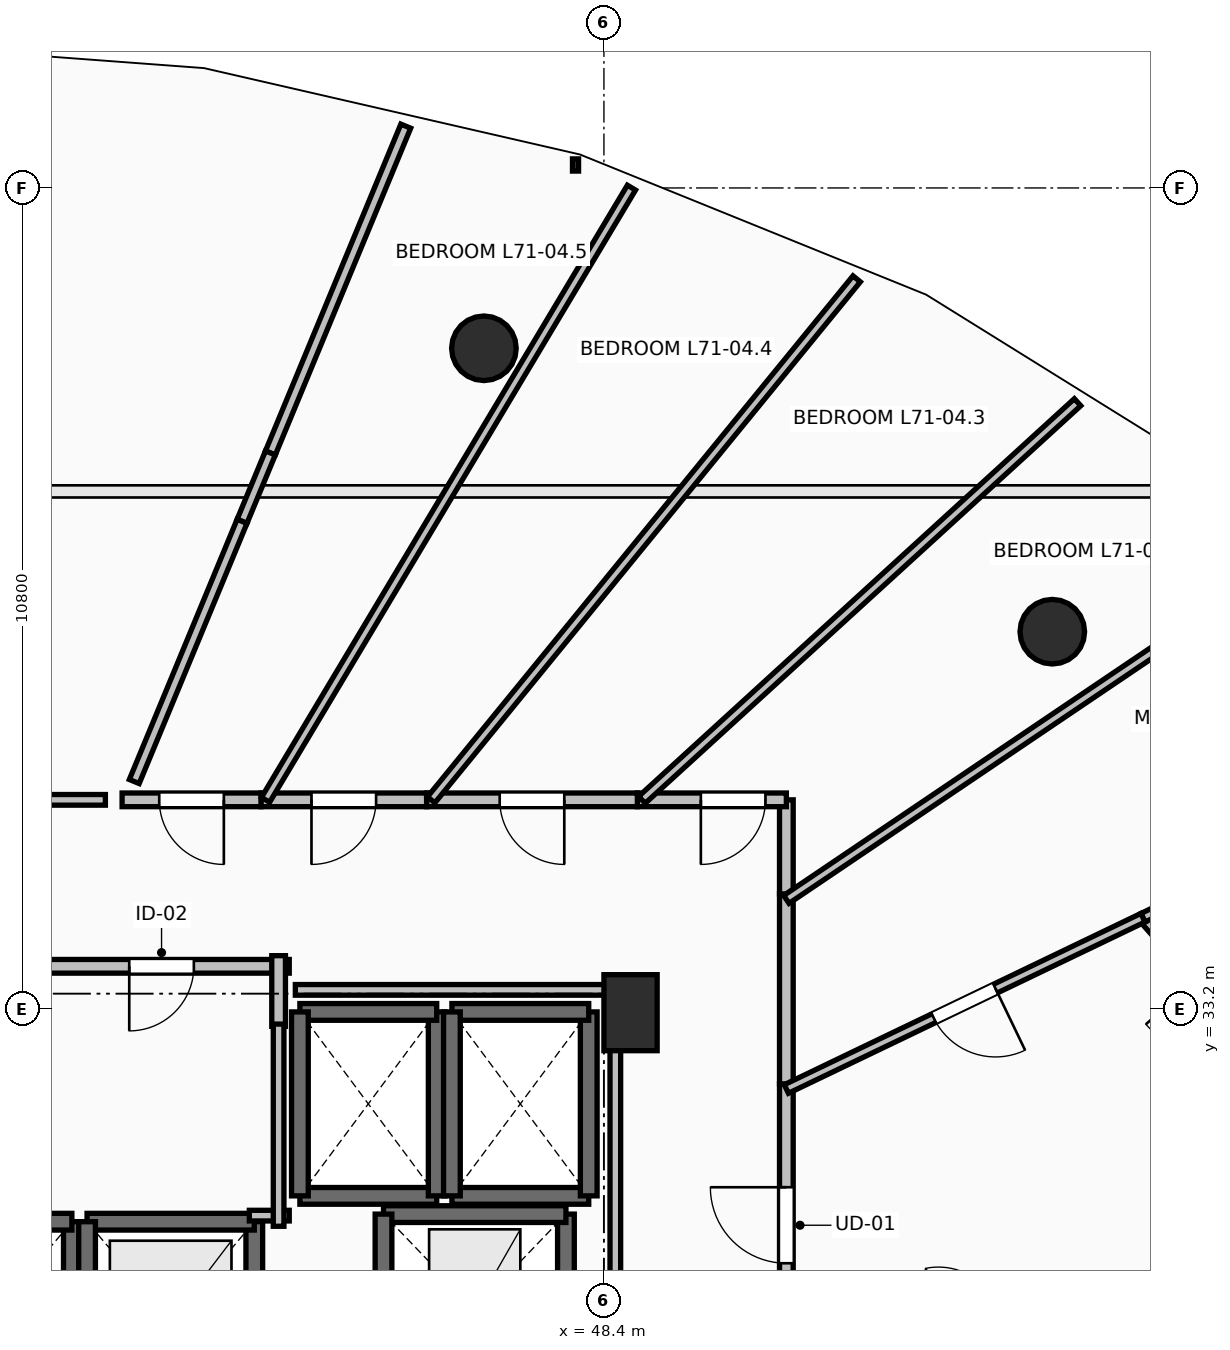
"""IFC4 building model, lengths in metres.
Left out: names, types, materials, properties, quantities, classifications, styles, units other than length and angle.
Written with IfcOpenShell. Run it as: python <this file> out.ifc"""

import sys

from ifc_helpers import new_model, si_unit, direction, frame, frame_2d, origin, origin_2d, place, context, subcontext, project, spatial, rectangle, circle, extrude, element, fill, save


model = new_model("IFC4")
c1 = context("Model", 3, precision=1e-05, world=origin(), true_north=direction((0.0, 1.0)))
c2 = subcontext(c1, "Body", "Model", "MODEL_VIEW")
j1 = project(units=[si_unit("LENGTHUNIT", "METRE"), si_unit("PLANEANGLEUNIT", "RADIAN")], contexts=[c1])
p1 = place(None, origin())
s1 = spatial("IfcSite", under=j1, at=p1, CompositionType="ELEMENT")
p2 = place(p1, origin())
s2 = spatial("IfcBuilding", under=s1, at=p2, CompositionType="ELEMENT")
p3 = place(p2, frame((0.0, 0.0, 262.65)))
s3 = spatial("IfcBuildingStorey", under=s2, at=p3, CompositionType="ELEMENT", Elevation=262.65)
for number, where, z_axis, x_axis in (
    (1, (54.299, 38.162, 0.0), (0.0, 0.0, 1.0), (0.707, 0.707, 0.0)),
    (2, (46.821, 41.891, 0.0), (0.0, 0.0, 1.0), (0.383, 0.924, 0.0)),
):
    element("IfcColumn", number, at=place(p3, frame(where, z_axis=z_axis, x_axis=x_axis)), inside=s3, PredefinedType="COLUMN", context=c2, shape_type="SweptSolid", body=[
        extrude(circle(Radius=0.425, at=origin_2d()), origin(), (0.0, 0.0, 1.0), 3.55),
    ])
p4 = place(p3, frame((48.75, 33.15, 0.0), z_axis=(0.0, 0.0, 1.0), x_axis=(1.0, 0.0, 0.0)))
e3 = element("IfcColumn", 3, at=p4, inside=s3, PredefinedType="PILASTER", context=c2, shape_type="SweptSolid", body=[
    extrude(rectangle(XDim=0.7, YDim=1.0, at=origin_2d()), origin(), (0.0, 0.0, 1.0), 3.55),
])
p5 = place(p3, frame((41.4, 27.8, 0.0), z_axis=(0.0, 0.0, 1.0), x_axis=(0.0, 1.0, 0.0)))
e4 = element("IfcWall", 4, at=p5, inside=s3, PredefinedType="SOLIDWALL", context=c2, shape_type="SweptSolid", body=[
    extrude(rectangle(XDim=2.6, YDim=0.22, at=frame_2d((1.3, 0.0))), origin(), (0.0, 0.0, 1.0), 3.29),
])
p6 = place(p3, frame((41.4, 30.4, 0.0), z_axis=(0.0, 0.0, 1.0), x_axis=(-1.0, 0.0, 0.0)))
e5 = element("IfcWall", 5, at=p6, inside=s3, PredefinedType="SOLIDWALL", context=c2, shape_type="SweptSolid", body=[
    extrude(rectangle(XDim=2.2, YDim=0.22, at=frame_2d((1.1, 0.0))), origin(), (0.0, 0.0, 1.0), 3.29),
])
p7 = place(p3, frame((43.8, 27.8, 0.0), z_axis=(0.0, 0.0, 1.0), x_axis=(0.0, 1.0, 0.0)))
e6 = element("IfcWall", 6, at=p7, inside=s3, PredefinedType="SOLIDWALL", context=c2, shape_type="SweptSolid", body=[
    extrude(rectangle(XDim=2.6, YDim=0.22, at=frame_2d((1.3, 0.0))), origin(), (0.0, 0.0, 1.0), 3.29),
])
p8 = place(p3, frame((43.8, 30.4, 0.0), z_axis=(0.0, 0.0, 1.0), x_axis=(-1.0, 0.0, 0.0)))
e7 = element("IfcWall", 7, at=p8, inside=s3, PredefinedType="SOLIDWALL", context=c2, shape_type="SweptSolid", body=[
    extrude(rectangle(XDim=2.2, YDim=0.22, at=frame_2d((1.1, 0.0))), origin(), (0.0, 0.0, 1.0), 3.29),
])
p9 = place(p3, frame((41.6, 30.4, 0.0), z_axis=(0.0, 0.0, 1.0), x_axis=(0.0, -1.0, 0.0)))
e8 = element("IfcWall", 8, at=p9, inside=s3, PredefinedType="SOLIDWALL", context=c2, shape_type="SweptSolid", body=[
    extrude(rectangle(XDim=2.6, YDim=0.22, at=frame_2d((1.3, 0.0))), origin(), (0.0, 0.0, 1.0), 3.29),
])
p10 = place(p3, frame((44.4, 30.74, 0.0), z_axis=(0.0, 0.0, 1.0), x_axis=(1.0, 0.0, 0.0)))
e9 = element("IfcWall", 9, at=p10, inside=s3, PredefinedType="SOLIDWALL", context=c2, shape_type="SweptSolid", body=[
    extrude(rectangle(XDim=1.8, YDim=0.22, at=frame_2d((0.9, 0.0))), origin(), (0.0, 0.0, 1.0), 3.29),
])
p11 = place(p3, frame((46.2, 30.74, 0.0), z_axis=(0.0, 0.0, 1.0), x_axis=(0.0, 1.0, 0.0)))
e10 = element("IfcWall", 10, at=p11, inside=s3, PredefinedType="SOLIDWALL", context=c2, shape_type="SweptSolid", body=[
    extrude(rectangle(XDim=2.42, YDim=0.22, at=frame_2d((1.21, 0.0))), origin(), (0.0, 0.0, 1.0), 3.29),
])
p12 = place(p3, frame((46.2, 33.16, 0.0), z_axis=(0.0, 0.0, 1.0), x_axis=(-1.0, 0.0, 0.0)))
e11 = element("IfcWall", 11, at=p12, inside=s3, PredefinedType="SOLIDWALL", context=c2, shape_type="SweptSolid", body=[
    extrude(rectangle(XDim=1.8, YDim=0.22, at=frame_2d((0.9, 0.0))), origin(), (0.0, 0.0, 1.0), 3.29),
])
p13 = place(p3, frame((44.4, 33.16, 0.0), z_axis=(0.0, 0.0, 1.0), x_axis=(0.0, -1.0, 0.0)))
e12 = element("IfcWall", 12, at=p13, inside=s3, PredefinedType="SOLIDWALL", context=c2, shape_type="SweptSolid", body=[
    extrude(rectangle(XDim=2.42, YDim=0.22, at=frame_2d((1.21, 0.0))), origin(), (0.0, 0.0, 1.0), 3.29),
])
p14 = place(p3, frame((46.4, 30.74, 0.0), z_axis=(0.0, 0.0, 1.0), x_axis=(1.0, 0.0, 0.0)))
e13 = element("IfcWall", 13, at=p14, inside=s3, PredefinedType="SOLIDWALL", context=c2, shape_type="SweptSolid", body=[
    extrude(rectangle(XDim=1.8, YDim=0.22, at=frame_2d((0.9, 0.0))), origin(), (0.0, 0.0, 1.0), 3.29),
])
p15 = place(p3, frame((48.2, 30.74, 0.0), z_axis=(0.0, 0.0, 1.0), x_axis=(0.0, 1.0, 0.0)))
e14 = element("IfcWall", 14, at=p15, inside=s3, PredefinedType="SOLIDWALL", context=c2, shape_type="SweptSolid", body=[
    extrude(rectangle(XDim=2.42, YDim=0.22, at=frame_2d((1.21, 0.0))), origin(), (0.0, 0.0, 1.0), 3.29),
])
p16 = place(p3, frame((48.2, 33.16, 0.0), z_axis=(0.0, 0.0, 1.0), x_axis=(-1.0, 0.0, 0.0)))
e15 = element("IfcWall", 15, at=p16, inside=s3, PredefinedType="SOLIDWALL", context=c2, shape_type="SweptSolid", body=[
    extrude(rectangle(XDim=1.8, YDim=0.22, at=frame_2d((0.9, 0.0))), origin(), (0.0, 0.0, 1.0), 3.29),
])
p17 = place(p3, frame((46.4, 33.16, 0.0), z_axis=(0.0, 0.0, 1.0), x_axis=(0.0, -1.0, 0.0)))
e16 = element("IfcWall", 16, at=p17, inside=s3, PredefinedType="SOLIDWALL", context=c2, shape_type="SweptSolid", body=[
    extrude(rectangle(XDim=2.42, YDim=0.22, at=frame_2d((1.21, 0.0))), origin(), (0.0, 0.0, 1.0), 3.29),
])
p18 = place(p3, frame((47.9, 28.0, 0.0), z_axis=(0.0, 0.0, 1.0), x_axis=(0.0, 1.0, 0.0)))
e17 = element("IfcWall", 17, at=p18, inside=s3, PredefinedType="SHEAR", context=c2, shape_type="SweptSolid", body=[
    extrude(rectangle(XDim=2.5, YDim=0.22, at=frame_2d((1.25, 0.0))), origin(), (0.0, 0.0, 1.0), 3.29),
])
p19 = place(p3, frame((47.9, 30.5, 0.0), z_axis=(0.0, 0.0, 1.0), x_axis=(-1.0, 0.0, 0.0)))
e18 = element("IfcWall", 18, at=p19, inside=s3, PredefinedType="SHEAR", context=c2, shape_type="SweptSolid", body=[
    extrude(rectangle(XDim=2.4, YDim=0.22, at=frame_2d((1.2, 0.0))), origin(), (0.0, 0.0, 1.0), 3.29),
])
p20 = place(p3, frame((45.5, 30.5, 0.0), z_axis=(0.0, 0.0, 1.0), x_axis=(0.0, -1.0, 0.0)))
e19 = element("IfcWall", 19, at=p20, inside=s3, PredefinedType="SHEAR", context=c2, shape_type="SweptSolid", body=[
    extrude(rectangle(XDim=2.5, YDim=0.22, at=frame_2d((1.25, 0.0))), origin(), (0.0, 0.0, 1.0), 3.29),
])
p21 = place(p3, frame((44.26, 33.76, 0.0), z_axis=(0.0, 0.0, 1.0), x_axis=(-1.0, 0.0, 0.0)))
e20 = element("IfcWall", 20, at=p21, inside=s3, PredefinedType="PARTITIONING", context=c2, shape_type="SweptSolid", body=[
    extrude(rectangle(XDim=3.36, YDim=0.18, at=frame_2d((1.68, 0.0))), origin(), (0.0, 0.0, 1.0), 3.29),
])
p22 = place(p21, frame((1.255, 0.0, 0.0)))
e21 = element("IfcOpeningElement", 21, at=p22, cuts=e20, PredefinedType="OPENING", context=c2, shape_type="SweptSolid", body=[
    extrude(rectangle(XDim=0.85, YDim=2.1, at=frame_2d((0.425, 1.05))), frame((0.0, 0.105, 0.0), z_axis=(0.0, -1.0, 0.0), x_axis=(1.0, 0.0, 0.0)), (0.0, 0.0, 1.0), 0.21),
])
p23 = place(p3, frame((44.12, 32.97, 0.0), z_axis=(0.0, 0.0, 1.0), x_axis=(0.0, 1.0, 0.0)))
e22 = element("IfcWall", 22, at=p23, inside=s3, PredefinedType="PARTITIONING", context=c2, shape_type="SweptSolid", body=[
    extrude(rectangle(XDim=0.93, YDim=0.18, at=frame_2d((0.465, 0.0))), origin(), (0.0, 0.0, 1.0), 3.29),
])
p24 = place(p3, frame((50.8, 28.494, 0.0), z_axis=(0.0, 0.0, 1.0), x_axis=(0.0, 1.0, 0.0)))
e23 = element("IfcWall", 23, at=p24, inside=s3, PredefinedType="PARTITIONING", context=c2, shape_type="SweptSolid", body=[
    extrude(rectangle(XDim=3.719, YDim=0.18, at=frame_2d((1.859, 0.0))), origin(), (0.0, 0.0, 1.0), 3.29),
])
p25 = place(p24, frame((1.36, 0.0, 0.0)))
e24 = element("IfcOpeningElement", 24, at=p25, cuts=e23, PredefinedType="OPENING", context=c2, shape_type="SweptSolid", body=[
    extrude(rectangle(XDim=1.0, YDim=2.15, at=frame_2d((0.5, 1.075))), frame((0.0, 0.105, 0.0), z_axis=(0.0, -1.0, 0.0), x_axis=(1.0, 0.0, 0.0)), (0.0, 0.0, 1.0), 0.21),
])
p26 = place(p3, frame((50.8, 32.213, 0.0), z_axis=(0.0, 0.0, 1.0), x_axis=(0.0, 1.0, 0.0)))
e25 = element("IfcWall", 25, at=p26, inside=s3, PredefinedType="PARTITIONING", context=c2, shape_type="SweptSolid", body=[
    extrude(rectangle(XDim=2.499, YDim=0.18, at=frame_2d((1.25, 0.0))), origin(), (0.0, 0.0, 1.0), 2.482),
])
p27 = place(p3, frame((50.8, 34.712, 0.0), z_axis=(0.0, 0.0, 1.0), x_axis=(0.0, 1.0, 0.0)))
e26 = element("IfcWall", 26, at=p27, inside=s3, PredefinedType="PARTITIONING", context=c2, shape_type="SweptSolid", body=[
    extrude(rectangle(XDim=1.238, YDim=0.18, at=frame_2d((0.619, 0.0))), origin(), (0.0, 0.0, 1.0), 2.482),
])
p28 = place(p3, frame((50.8, 35.95, 0.0), z_axis=(0.0, 0.0, 1.0), x_axis=(-1.0, 0.0, 0.0)))
e27 = element("IfcWall", 27, at=p28, inside=s3, PredefinedType="PARTITIONING", context=c2, shape_type="SweptSolid", body=[
    extrude(rectangle(XDim=1.96, YDim=0.18, at=frame_2d((0.98, 0.0))), origin(), (0.0, 0.0, 1.0), 2.936),
])
p29 = place(p28, frame((0.275, 0.0, 0.0)))
e28 = element("IfcOpeningElement", 28, at=p29, cuts=e27, PredefinedType="OPENING", context=c2, shape_type="SweptSolid", body=[
    extrude(rectangle(XDim=0.85, YDim=2.1, at=frame_2d((0.425, 1.05))), frame((0.0, 0.105, 0.0), z_axis=(0.0, -1.0, 0.0), x_axis=(1.0, 0.0, 0.0)), (0.0, 0.0, 1.0), 0.21),
])
p30 = place(p3, frame((48.84, 35.95, 0.0), z_axis=(0.0, 0.0, 1.0), x_axis=(-1.0, 0.0, 0.0)))
e29 = element("IfcWall", 29, at=p30, inside=s3, PredefinedType="PARTITIONING", context=c2, shape_type="SweptSolid", body=[
    extrude(rectangle(XDim=2.773, YDim=0.18, at=frame_2d((1.387, 0.0))), origin(), (0.0, 0.0, 1.0), 2.482),
])
p31 = place(p30, frame((0.961, 0.0, 0.0)))
e30 = element("IfcOpeningElement", 30, at=p31, cuts=e29, PredefinedType="OPENING", context=c2, shape_type="SweptSolid", body=[
    extrude(rectangle(XDim=0.85, YDim=2.1, at=frame_2d((0.425, 1.05))), frame((0.0, 0.105, 0.0), z_axis=(0.0, -1.0, 0.0), x_axis=(1.0, 0.0, 0.0)), (0.0, 0.0, 1.0), 0.21),
])
p32 = place(p3, frame((46.067, 35.95, 0.0), z_axis=(0.0, 0.0, 1.0), x_axis=(-1.0, 0.0, 0.0)))
e31 = element("IfcWall", 31, at=p32, inside=s3, PredefinedType="PARTITIONING", context=c2, shape_type="SweptSolid", body=[
    extrude(rectangle(XDim=2.179, YDim=0.18, at=frame_2d((1.089, 0.0))), origin(), (0.0, 0.0, 1.0), 3.29),
])
p33 = place(p32, frame((0.665, 0.0, 0.0)))
e32 = element("IfcOpeningElement", 32, at=p33, cuts=e31, PredefinedType="OPENING", context=c2, shape_type="SweptSolid", body=[
    extrude(rectangle(XDim=0.85, YDim=2.1, at=frame_2d((0.425, 1.05))), frame((0.0, 0.105, 0.0), z_axis=(0.0, -1.0, 0.0), x_axis=(1.0, 0.0, 0.0)), (0.0, 0.0, 1.0), 0.21),
])
p34 = place(p3, frame((43.888, 35.95, 0.0), z_axis=(0.0, 0.0, 1.0), x_axis=(-1.0, 0.0, 0.0)))
e33 = element("IfcWall", 33, at=p34, inside=s3, PredefinedType="PARTITIONING", context=c2, shape_type="SweptSolid", body=[
    extrude(rectangle(XDim=1.827, YDim=0.18, at=frame_2d((0.914, 0.0))), origin(), (0.0, 0.0, 1.0), 3.29),
])
p35 = place(p34, frame((0.489, 0.0, 0.0)))
e34 = element("IfcOpeningElement", 34, at=p35, cuts=e33, PredefinedType="OPENING", context=c2, shape_type="SweptSolid", body=[
    extrude(rectangle(XDim=0.85, YDim=2.1, at=frame_2d((0.425, 1.05))), frame((0.0, 0.105, 0.0), z_axis=(0.0, -1.0, 0.0), x_axis=(1.0, 0.0, 0.0)), (0.0, 0.0, 1.0), 0.21),
])
p36 = place(p3, frame((57.512, 32.112, 0.0), z_axis=(0.0, 0.0, 1.0), x_axis=(-0.662026430628, 0.749480490173, 0.0)))
e35 = element("IfcWall", 35, at=p36, inside=s3, PredefinedType="PARTITIONING", context=c2, shape_type="SweptSolid", body=[
    extrude(rectangle(XDim=3.051, YDim=0.125, at=frame_2d((1.526, 0.0))), origin(), (0.0, 0.0, 1.0), 2.482),
])
p37 = place(p36, frame((1.076, 0.0, 0.0)))
e36 = element("IfcOpeningElement", 36, at=p37, cuts=e35, PredefinedType="OPENING", context=c2, shape_type="SweptSolid", body=[
    extrude(rectangle(XDim=0.9, YDim=2.1, at=frame_2d((0.45, 1.05))), frame((0.0, 0.077, 0.0), z_axis=(0.0, -1.0, 0.0), x_axis=(1.0, 0.0, 0.0)), (0.0, 0.0, 1.0), 0.155),
])
p38 = place(p3, frame((55.492, 34.399, 0.0), z_axis=(0.0, 0.0, 1.0), x_axis=(0.901372521065, 0.433044545363, 0.0)))
e37 = element("IfcWall", 37, at=p38, inside=s3, PredefinedType="PARTITIONING", context=c2, shape_type="SweptSolid", body=[
    extrude(rectangle(XDim=2.152, YDim=0.125, at=frame_2d((1.076, 0.0))), origin(), (0.0, 0.0, 1.0), 2.874),
])
p39 = place(p3, frame((55.492, 34.399, 0.0), z_axis=(0.0, 0.0, 1.0), x_axis=(-0.901416162018, -0.432953695968, 0.0)))
e38 = element("IfcWall", 38, at=p39, inside=s3, PredefinedType="PARTITIONING", context=c2, shape_type="SweptSolid", body=[
    extrude(rectangle(XDim=5.205, YDim=0.125, at=frame_2d((2.603, 0.0))), origin(), (0.0, 0.0, 1.0), 2.482),
])
p40 = place(p39, frame((2.152, 0.0, 0.0)))
e39 = element("IfcOpeningElement", 39, at=p40, cuts=e38, PredefinedType="OPENING", context=c2, shape_type="SweptSolid", body=[
    extrude(rectangle(XDim=0.9, YDim=2.1, at=frame_2d((0.45, 1.05))), frame((0.0, 0.077, 0.0), z_axis=(0.0, -1.0, 0.0), x_axis=(1.0, 0.0, 0.0)), (0.0, 0.0, 1.0), 0.155),
])
p41 = place(p3, frame((57.466, 39.14, 0.0), z_axis=(0.0, 0.0, 1.0), x_axis=(-0.828823335801, -0.559510391352, 0.0)))
e40 = element("IfcWall", 40, at=p41, inside=s3, PredefinedType="PARTITIONING", context=c2, shape_type="SweptSolid", body=[
    extrude(rectangle(XDim=8.043, YDim=0.125, at=frame_2d((4.021, 0.0))), origin(), (0.0, 0.0, 1.0), 2.482),
])
p42 = place(p3, frame((54.631, 41.181, 0.0), z_axis=(0.0, 0.0, 1.0), x_axis=(-0.73860604902, -0.674137303783, 0.0)))
e41 = element("IfcWall", 41, at=p42, inside=s3, PredefinedType="PARTITIONING", context=c2, shape_type="SweptSolid", body=[
    extrude(rectangle(XDim=7.76, YDim=0.125, at=frame_2d((3.88, 0.0))), origin(), (0.0, 0.0, 1.0), 2.874),
])
p43 = place(p3, frame((51.725, 42.804, 0.0), z_axis=(0.0, 0.0, 1.0), x_axis=(-0.632582563989, -0.774492930721, 0.0)))
e42 = element("IfcWall", 42, at=p43, inside=s3, PredefinedType="PARTITIONING", context=c2, shape_type="SweptSolid", body=[
    extrude(rectangle(XDim=8.85, YDim=0.125, at=frame_2d((4.425, 0.0))), origin(), (0.0, 0.0, 1.0), 2.482),
])
p44 = place(p3, frame((48.762, 44.004, 0.0), z_axis=(0.0, 0.0, 1.0), x_axis=(-0.51305247577, -0.858357243289, 0.0)))
e43 = element("IfcWall", 43, at=p44, inside=s3, PredefinedType="PARTITIONING", context=c2, shape_type="SweptSolid", body=[
    extrude(rectangle(XDim=9.383, YDim=0.125, at=frame_2d((4.691, 0.0))), origin(), (0.0, 0.0, 1.0), 2.482),
])
p45 = place(p3, frame((43.735, 30.48, 0.0), z_axis=(0.0, 0.0, 1.0), x_axis=(1.0, 0.0, 0.0)))
e44 = element("IfcWall", 44, at=p45, inside=s3, PredefinedType="PARTITIONING", context=c2, shape_type="SweptSolid", body=[
    extrude(rectangle(XDim=0.525, YDim=0.14, at=frame_2d((0.262, 0.0))), origin(), (0.0, 0.0, 1.0), 3.29),
])
p46 = place(p3, frame((44.12, 30.34, 0.0), z_axis=(0.0, 0.0, 1.0), x_axis=(0.0, 1.0, 0.0)))
e45 = element("IfcWall", 45, at=p46, inside=s3, PredefinedType="PARTITIONING", context=c2, shape_type="SweptSolid", body=[
    extrude(rectangle(XDim=2.66, YDim=0.14, at=frame_2d((1.33, 0.0))), origin(), (0.0, 0.0, 1.0), 3.29),
])
p47 = place(p3, frame((41.841, 35.95, 0.0), z_axis=(0.0, 0.0, 1.0), x_axis=(-1.0, 0.0, 0.0)))
e46 = element("IfcWall", 46, at=p47, inside=s3, PredefinedType="PARTITIONING", context=c2, shape_type="SweptSolid", body=[
    extrude(rectangle(XDim=2.391, YDim=0.14, at=frame_2d((1.196, 0.0))), origin(), (0.0, 0.0, 1.0), 3.29),
])
p48 = place(p3, frame((48.55, 28.196, 0.0), z_axis=(0.0, 0.0, 1.0), x_axis=(0.0, 1.0, 0.0)))
e47 = element("IfcWall", 47, at=p48, inside=s3, PredefinedType="PARTITIONING", context=c2, shape_type="SweptSolid", body=[
    extrude(rectangle(XDim=5.254, YDim=0.14, at=frame_2d((2.627, 0.0))), origin(), (0.0, 0.0, 1.0), 2.482),
])
p49 = place(p3, frame((48.55, 33.45, 0.0), z_axis=(0.0, 0.0, 1.0), x_axis=(-1.0, 0.0, 0.0)))
e48 = element("IfcWall", 48, at=p49, inside=s3, PredefinedType="PARTITIONING", context=c2, shape_type="SweptSolid", body=[
    extrude(rectangle(XDim=4.21, YDim=0.14, at=frame_2d((2.105, 0.0))), origin(), (0.0, 0.0, 1.0), 2.482),
])
p50 = place(p3, frame((45.793, 44.813, 0.0), z_axis=(0.0, 0.0, 1.0), x_axis=(-0.382733290986, -0.923858878818, 0.0)))
e49 = element("IfcWall", 49, at=p50, inside=s3, PredefinedType="PARTITIONING", context=c2, shape_type="SweptSolid", body=[
    extrude(rectangle(XDim=4.653, YDim=0.14, at=frame_2d((2.327, 0.0))), origin(), (0.0, 0.0, 1.0), 2.874),
])
p51 = place(p3, frame((44.012, 40.514, 0.0), z_axis=(0.0, 0.0, 1.0), x_axis=(-0.382941999237, -0.923772388211, 0.0)))
e50 = element("IfcWall", 50, at=p51, inside=s3, PredefinedType="PARTITIONING", context=c2, shape_type="SweptSolid", body=[
    extrude(rectangle(XDim=0.974, YDim=0.14, at=frame_2d((0.487, 0.0))), origin(), (0.0, 0.0, 1.0), 3.29),
])
p52 = place(p3, frame((43.639, 39.614, 0.0), z_axis=(0.0, 0.0, 1.0), x_axis=(-0.38270095978, -0.923872272224, 0.0)))
e51 = element("IfcWall", 51, at=p52, inside=s3, PredefinedType="PARTITIONING", context=c2, shape_type="SweptSolid", body=[
    extrude(rectangle(XDim=3.705, YDim=0.14, at=frame_2d((1.853, 0.0))), origin(), (0.0, 0.0, 1.0), 2.936),
])
p53 = place(p22, origin())
e52 = element("IfcDoor", 52, at=p53, inside=s3, OperationType="SINGLE_SWING_RIGHT", PredefinedType="DOOR", context=c2, shape_type="SweptSolid", body=[
    extrude(rectangle(XDim=0.85, YDim=2.1, at=frame_2d((0.425, 1.05))), frame((0.0, 0.025, 0.0), z_axis=(0.0, -1.0, 0.0), x_axis=(1.0, 0.0, 0.0)), (0.0, 0.0, 1.0), 0.05),
])
fill(e21, e52)
p54 = place(p25, origin())
e53 = element("IfcDoor", 53, at=p54, inside=s3, OperationType="SINGLE_SWING_RIGHT", PredefinedType="DOOR", context=c2, shape_type="SweptSolid", body=[
    extrude(rectangle(XDim=1.0, YDim=2.15, at=frame_2d((0.5, 1.075))), frame((0.0, 0.025, 0.0), z_axis=(0.0, -1.0, 0.0), x_axis=(1.0, 0.0, 0.0)), (0.0, 0.0, 1.0), 0.05),
])
fill(e24, e53)
p55 = place(p40, origin())
e54 = element("IfcDoor", 54, at=p55, inside=s3, OperationType="SINGLE_SWING_LEFT", PredefinedType="DOOR", context=c2, shape_type="SweptSolid", body=[
    extrude(rectangle(XDim=0.9, YDim=2.1, at=frame_2d((0.45, 1.05))), frame((0.0, 0.025, 0.0), z_axis=(0.0, -1.0, 0.0), x_axis=(1.0, 0.0, 0.0)), (0.0, 0.0, 1.0), 0.05),
])
fill(e39, e54)
p56 = place(p29, origin())
e55 = element("IfcDoor", 55, at=p56, inside=s3, OperationType="SINGLE_SWING_RIGHT", PredefinedType="DOOR", context=c2, shape_type="SweptSolid", body=[
    extrude(rectangle(XDim=0.85, YDim=2.1, at=frame_2d((0.425, 1.05))), frame((0.0, 0.025, 0.0), z_axis=(0.0, -1.0, 0.0), x_axis=(1.0, 0.0, 0.0)), (0.0, 0.0, 1.0), 0.05),
])
fill(e28, e55)
p57 = place(p31, origin())
e56 = element("IfcDoor", 56, at=p57, inside=s3, OperationType="SINGLE_SWING_LEFT", PredefinedType="DOOR", context=c2, shape_type="SweptSolid", body=[
    extrude(rectangle(XDim=0.85, YDim=2.1, at=frame_2d((0.425, 1.05))), frame((0.0, 0.025, 0.0), z_axis=(0.0, -1.0, 0.0), x_axis=(1.0, 0.0, 0.0)), (0.0, 0.0, 1.0), 0.05),
])
fill(e30, e56)
p58 = place(p33, origin())
e57 = element("IfcDoor", 57, at=p58, inside=s3, OperationType="SINGLE_SWING_RIGHT", PredefinedType="DOOR", context=c2, shape_type="SweptSolid", body=[
    extrude(rectangle(XDim=0.85, YDim=2.1, at=frame_2d((0.425, 1.05))), frame((0.0, 0.025, 0.0), z_axis=(0.0, -1.0, 0.0), x_axis=(1.0, 0.0, 0.0)), (0.0, 0.0, 1.0), 0.05),
])
fill(e32, e57)
p59 = place(p35, origin())
e58 = element("IfcDoor", 58, at=p59, inside=s3, OperationType="SINGLE_SWING_LEFT", PredefinedType="DOOR", context=c2, shape_type="SweptSolid", body=[
    extrude(rectangle(XDim=0.85, YDim=2.1, at=frame_2d((0.425, 1.05))), frame((0.0, 0.025, 0.0), z_axis=(0.0, -1.0, 0.0), x_axis=(1.0, 0.0, 0.0)), (0.0, 0.0, 1.0), 0.05),
])
fill(e34, e58)
save(model, sys.argv[1])
